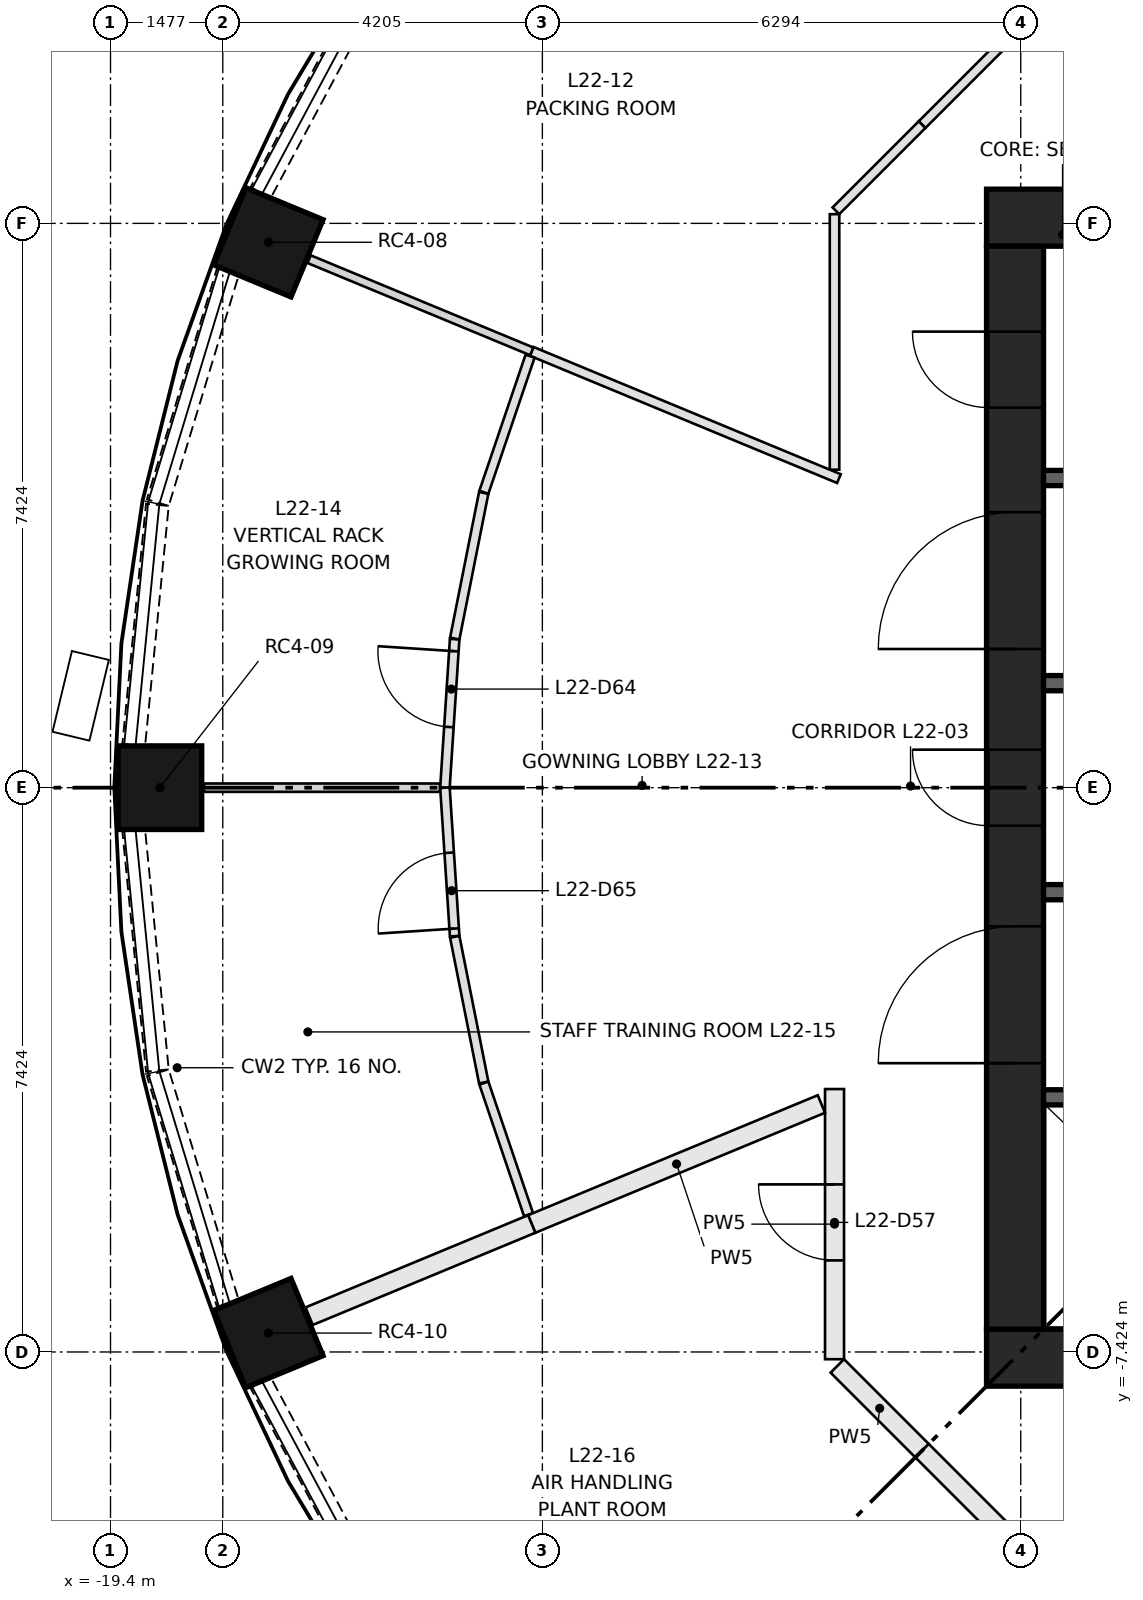
"""IFC4 building model, lengths in metres.
Left out: names, types, materials, properties, quantities, classifications, styles, units other than length and angle.
Written with IfcOpenShell. Run it as: python <this file> out.ifc"""

import sys

from ifc_helpers import new_model, si_unit, direction, frame, frame_2d, origin, origin_2d, place, context, subcontext, project, spatial, rectangle, extrude, element, fill, save


model = new_model("IFC4")
c1 = context("Model", 3, precision=1e-05, world=origin(), true_north=direction((0.0, 1.0)))
c2 = subcontext(c1, "Body", "Model", "MODEL_VIEW")
j1 = project(units=[si_unit("LENGTHUNIT", "METRE"), si_unit("PLANEANGLEUNIT", "RADIAN")], contexts=[c1])
p1 = place(None, origin())
s1 = spatial("IfcSite", under=j1, at=p1, CompositionType="ELEMENT")
p2 = place(p1, origin())
s2 = spatial("IfcBuilding", under=s1, at=p2, CompositionType="ELEMENT")
p3 = place(p2, frame((0.0, 0.0, 87.35)))
s3 = spatial("IfcBuildingStorey", under=s2, at=p3, CompositionType="ELEMENT", Elevation=87.35)
for number, where, z_axis, x_axis in (
    (1, (-17.323, 7.175, 0.0), (0.0, 0.0, 1.0), (-0.924, 0.383, 0.0)),
    (2, (-18.75, 0.0, 0.0), (0.0, 0.0, 1.0), (-1.0, 0.0, 0.0)),
    (3, (-17.323, -7.175, 0.0), (0.0, 0.0, 1.0), (-0.924, -0.383, 0.0)),
):
    element("IfcColumn", number, at=place(p3, frame(where, z_axis=z_axis, x_axis=x_axis)), inside=s3, PredefinedType="COLUMN", context=c2, shape_type="SweptSolid", body=[
        extrude(rectangle(XDim=1.1, YDim=1.1, at=origin_2d()), origin(), (0.0, 0.0, 1.0), 3.65),
    ])
for number, where, z_axis, x_axis in (
    (4, (-7.874, -7.499, 0.0), (0.0, 0.0, 1.0), (1.0, 0.0, 0.0)),
    (5, (-7.874, 7.499, 0.0), (0.0, 0.0, 1.0), (1.0, 0.0, 0.0)),
):
    element("IfcWall", number, at=place(p3, frame(where, z_axis=z_axis, x_axis=x_axis)), inside=s3, PredefinedType="SHEAR", context=c2, shape_type="SweptSolid", body=[
        extrude(rectangle(XDim=15.748, YDim=0.75, at=frame_2d((7.874, 0.0))), origin(), (0.0, 0.0, 1.0), 3.65),
    ])
p4 = place(p3, frame((-7.499, -7.124, 0.0), z_axis=(0.0, 0.0, 1.0), x_axis=(0.0, 1.0, 0.0)))
e6 = element("IfcWall", 6, at=p4, inside=s3, PredefinedType="SHEAR", context=c2, shape_type="SweptSolid", body=[
    extrude(rectangle(XDim=14.248, YDim=0.75, at=frame_2d((7.124, 0.0))), origin(), (0.0, 0.0, 1.0), 3.65),
])
p5 = place(p4, frame((6.624, 0.0, 0.0)))
e7 = element("IfcOpeningElement", 7, at=p5, cuts=e6, PredefinedType="OPENING", context=c2, shape_type="SweptSolid", body=[
    extrude(rectangle(XDim=1.0, YDim=2.1, at=frame_2d((0.5, 1.05))), frame((0.0, 0.385, 0.0), z_axis=(0.0, -1.0, 0.0), x_axis=(1.0, 0.0, 0.0)), (0.0, 0.0, 1.0), 0.77),
])
p6 = place(p4, frame((3.5, 0.0, 0.0)))
e8 = element("IfcOpeningElement", 8, at=p6, cuts=e6, PredefinedType="OPENING", context=c2, shape_type="SweptSolid", body=[
    extrude(rectangle(XDim=1.8, YDim=2.1, at=frame_2d((0.9, 1.05))), frame((0.0, 0.385, 0.0), z_axis=(0.0, -1.0, 0.0), x_axis=(1.0, 0.0, 0.0)), (0.0, 0.0, 1.0), 0.77),
])
p7 = place(p4, frame((8.948, 0.0, 0.0)))
e9 = element("IfcOpeningElement", 9, at=p7, cuts=e6, PredefinedType="OPENING", context=c2, shape_type="SweptSolid", body=[
    extrude(rectangle(XDim=1.8, YDim=2.1, at=frame_2d((0.9, 1.05))), frame((0.0, 0.385, 0.0), z_axis=(0.0, -1.0, 0.0), x_axis=(1.0, 0.0, 0.0)), (0.0, 0.0, 1.0), 0.77),
])
p8 = place(p4, frame((12.124, 0.0, 0.0)))
e10 = element("IfcOpeningElement", 10, at=p8, cuts=e6, PredefinedType="OPENING", context=c2, shape_type="SweptSolid", body=[
    extrude(rectangle(XDim=1.0, YDim=2.1, at=frame_2d((0.5, 1.05))), frame((0.0, 0.385, 0.0), z_axis=(0.0, -1.0, 0.0), x_axis=(1.0, 0.0, 0.0)), (0.0, 0.0, 1.0), 0.77),
])
p9 = place(p3, frame((-7.124, -4.074, 0.0), z_axis=(0.0, 0.0, 1.0), x_axis=(1.0, 0.0, 0.0)))
e11 = element("IfcWall", 11, at=p9, inside=s3, PredefinedType="SHEAR", context=c2, shape_type="SweptSolid", body=[
    extrude(rectangle(XDim=14.248, YDim=0.2, at=frame_2d((7.124, 0.0))), origin(), (0.0, 0.0, 1.0), 3.3),
])
p10 = place(p9, frame((1.069, 0.0, 0.0)))
e12 = element("IfcOpeningElement", 12, at=p10, cuts=e11, PredefinedType="OPENING", context=c2, shape_type="SweptSolid", body=[
    extrude(rectangle(XDim=1.1, YDim=2.1, at=frame_2d((0.55, 1.05))), frame((0.0, 0.11, 0.0), z_axis=(0.0, -1.0, 0.0), x_axis=(1.0, 0.0, 0.0)), (0.0, 0.0, 1.0), 0.22),
])
p11 = place(p9, frame((4.206, 0.0, 0.0)))
e13 = element("IfcOpeningElement", 13, at=p11, cuts=e11, PredefinedType="OPENING", context=c2, shape_type="SweptSolid", body=[
    extrude(rectangle(XDim=1.1, YDim=2.1, at=frame_2d((0.55, 1.05))), frame((0.0, 0.11, 0.0), z_axis=(0.0, -1.0, 0.0), x_axis=(1.0, 0.0, 0.0)), (0.0, 0.0, 1.0), 0.22),
])
p12 = place(p9, frame((6.808, 0.0, 0.0)))
e14 = element("IfcOpeningElement", 14, at=p12, cuts=e11, PredefinedType="OPENING", context=c2, shape_type="SweptSolid", body=[
    extrude(rectangle(XDim=1.0, YDim=2.1, at=frame_2d((0.5, 1.05))), frame((0.0, 0.11, 0.0), z_axis=(0.0, -1.0, 0.0), x_axis=(1.0, 0.0, 0.0)), (0.0, 0.0, 1.0), 0.22),
])
p13 = place(p9, frame((8.777, 0.0, 0.0)))
e15 = element("IfcOpeningElement", 15, at=p13, cuts=e11, PredefinedType="OPENING", context=c2, shape_type="SweptSolid", body=[
    extrude(rectangle(XDim=1.0, YDim=2.1, at=frame_2d((0.5, 1.05))), frame((0.0, 0.11, 0.0), z_axis=(0.0, -1.0, 0.0), x_axis=(1.0, 0.0, 0.0)), (0.0, 0.0, 1.0), 0.22),
])
p14 = place(p9, frame((10.745, 0.0, 0.0)))
e16 = element("IfcOpeningElement", 16, at=p14, cuts=e11, PredefinedType="OPENING", context=c2, shape_type="SweptSolid", body=[
    extrude(rectangle(XDim=1.0, YDim=2.1, at=frame_2d((0.5, 1.05))), frame((0.0, 0.11, 0.0), z_axis=(0.0, -1.0, 0.0), x_axis=(1.0, 0.0, 0.0)), (0.0, 0.0, 1.0), 0.22),
])
p15 = place(p9, frame((12.714, 0.0, 0.0)))
e17 = element("IfcOpeningElement", 17, at=p15, cuts=e11, PredefinedType="OPENING", context=c2, shape_type="SweptSolid", body=[
    extrude(rectangle(XDim=1.0, YDim=2.1, at=frame_2d((0.5, 1.05))), frame((0.0, 0.11, 0.0), z_axis=(0.0, -1.0, 0.0), x_axis=(1.0, 0.0, 0.0)), (0.0, 0.0, 1.0), 0.22),
])
p16 = place(p3, frame((-7.124, 4.074, 0.0), z_axis=(0.0, 0.0, 1.0), x_axis=(1.0, 0.0, 0.0)))
e18 = element("IfcWall", 18, at=p16, inside=s3, PredefinedType="SHEAR", context=c2, shape_type="SweptSolid", body=[
    extrude(rectangle(XDim=7.124, YDim=0.2, at=frame_2d((3.562, 0.0))), origin(), (0.0, 0.0, 1.0), 3.3),
])
for number, where, z_axis, x_axis in (
    (19, (-7.124, -1.375, 0.0), (0.0, 0.0, 1.0), (1.0, 0.0, 0.0)),
    (20, (-7.124, 1.375, 0.0), (0.0, 0.0, 1.0), (1.0, 0.0, 0.0)),
):
    element("IfcWall", number, at=place(p3, frame(where, z_axis=z_axis, x_axis=x_axis)), inside=s3, PredefinedType="SHEAR", context=c2, shape_type="SweptSolid", body=[
        extrude(rectangle(XDim=2.75, YDim=0.2, at=frame_2d((1.375, 0.0))), origin(), (0.0, 0.0, 1.0), 3.3),
    ])
p17 = place(p3, frame((-15.929, 10.626, 0.0), z_axis=(0.0, 0.0, 1.0), x_axis=(-0.471458802606, -0.88188808669, 0.0)))
e21 = element("IfcWall", 21, at=p17, inside=s3, PredefinedType="SOLIDWALL", context=c2, shape_type="SweptSolid", body=[
    extrude(rectangle(XDim=3.172, YDim=0.3, at=frame_2d((1.586, 0.0))), origin(), (0.0, 0.0, 1.0), 0.9),
])
p18 = place(p3, frame((-17.856, 6.787, 0.0), z_axis=(0.0, 0.0, 1.0), x_axis=(-0.290325591482, -0.956927923582, 0.0)))
e22 = element("IfcWall", 22, at=p18, inside=s3, PredefinedType="SOLIDWALL", context=c2, shape_type="SweptSolid", body=[
    extrude(rectangle(XDim=3.173, YDim=0.3, at=frame_2d((1.586, 0.0))), origin(), (0.0, 0.0, 1.0), 0.9),
])
for number, where, z_axis, x_axis in (
    (23, (-18.783, 3.721, 0.0), (0.0, 0.0, 1.0), (-0.098, -0.995, 0.0)),
    (24, (-19.094, -0.564, 0.0), (0.0, 0.0, 1.0), (0.098, -0.995, 0.0)),
):
    element("IfcWall", number, at=place(p3, frame(where, z_axis=z_axis, x_axis=x_axis)), inside=s3, PredefinedType="SOLIDWALL", context=c2, shape_type="SweptSolid", body=[
        extrude(rectangle(XDim=3.173, YDim=0.3, at=frame_2d((1.586, 0.0))), origin(), (0.0, 0.0, 1.0), 0.9),
    ])
p19 = place(p3, frame((-18.778, -3.75, 0.0), z_axis=(0.0, 0.0, 1.0), x_axis=(0.290325591482, -0.956927923582, 0.0)))
e25 = element("IfcWall", 25, at=p19, inside=s3, PredefinedType="SOLIDWALL", context=c2, shape_type="SweptSolid", body=[
    extrude(rectangle(XDim=3.173, YDim=0.3, at=frame_2d((1.586, 0.0))), origin(), (0.0, 0.0, 1.0), 0.9),
])
p20 = place(p3, frame((-17.425, -7.828, 0.0), z_axis=(0.0, 0.0, 1.0), x_axis=(0.471458802606, -0.88188808669, 0.0)))
e26 = element("IfcWall", 26, at=p20, inside=s3, PredefinedType="SOLIDWALL", context=c2, shape_type="SweptSolid", body=[
    extrude(rectangle(XDim=3.172, YDim=0.3, at=frame_2d((1.586, 0.0))), origin(), (0.0, 0.0, 1.0), 0.9),
])
p21 = place(p3, frame((-8.722, 8.722, 0.0), z_axis=(0.0, 0.0, 1.0), x_axis=(0.707030604857, 0.70718294931, 0.0)))
e27 = element("IfcWall", 27, at=p21, inside=s3, PredefinedType="PARTITIONING", context=c2, shape_type="SweptSolid", body=[
    extrude(rectangle(XDim=1.603, YDim=0.125, at=frame_2d((0.801, 0.0))), origin(), (0.0, 0.0, 1.0), 3.3),
])
p22 = place(p3, frame((-9.874, 4.183, 0.0), z_axis=(0.0, 0.0, 1.0), x_axis=(0.0, 1.0, 0.0)))
e28 = element("IfcWall", 28, at=p22, inside=s3, PredefinedType="PARTITIONING", context=c2, shape_type="SweptSolid", body=[
    extrude(rectangle(XDim=3.362, YDim=0.125, at=frame_2d((1.681, 0.0))), origin(), (0.0, 0.0, 1.0), 3.3),
])
p23 = place(p3, frame((-9.856, 7.589, 0.0), z_axis=(0.0, 0.0, 1.0), x_axis=(0.70718294931, 0.707030604857, 0.0)))
e29 = element("IfcWall", 29, at=p23, inside=s3, PredefinedType="PARTITIONING", context=c2, shape_type="SweptSolid", body=[
    extrude(rectangle(XDim=1.603, YDim=0.125, at=frame_2d((0.801, 0.0))), origin(), (0.0, 0.0, 1.0), 3.3),
])
p24 = place(p3, frame((-9.874, -7.519, 0.0), z_axis=(0.0, 0.0, 1.0), x_axis=(0.0, 1.0, 0.0)))
e30 = element("IfcWall", 30, at=p24, inside=s3, PredefinedType="PARTITIONING", context=c2, shape_type="SweptSolid", body=[
    extrude(rectangle(XDim=3.554, YDim=0.25, at=frame_2d((1.777, 0.0))), origin(), (0.0, 0.0, 1.0), 3.3),
])
p25 = place(p24, frame((1.3, 0.0, 0.0)))
e31 = element("IfcOpeningElement", 31, at=p25, cuts=e30, PredefinedType="OPENING", context=c2, shape_type="SweptSolid", body=[
    extrude(rectangle(XDim=1.0, YDim=2.1, at=frame_2d((0.5, 1.05))), frame((0.0, 0.135, 0.0), z_axis=(0.0, -1.0, 0.0), x_axis=(1.0, 0.0, 0.0)), (0.0, 0.0, 1.0), 0.27),
])
for number, where, z_axis, x_axis in (
    (32, (-8.722, -8.722, 0.0), (0.0, 0.0, 1.0), (-0.707, 0.707, 0.0)),
    (33, (-7.608, -9.837, 0.0), (0.0, 0.0, 1.0), (-0.707, 0.707, 0.0)),
):
    element("IfcWall", number, at=place(p3, frame(where, z_axis=z_axis, x_axis=x_axis)), inside=s3, PredefinedType="PARTITIONING", context=c2, shape_type="SweptSolid", body=[
        extrude(rectangle(XDim=1.577, YDim=0.25, at=frame_2d((0.788, 0.0))), origin(), (0.0, 0.0, 1.0), 3.3),
    ])
p26 = place(p3, frame((-9.816, 4.066, 0.0), z_axis=(0.0, 0.0, 1.0), x_axis=(-0.923865829688, 0.382716512232, 0.0)))
e34 = element("IfcWall", 34, at=p26, inside=s3, PredefinedType="PARTITIONING", context=c2, shape_type="SweptSolid", body=[
    extrude(rectangle(XDim=4.375, YDim=0.125, at=frame_2d((2.188, 0.0))), origin(), (0.0, 0.0, 1.0), 3.3),
])
p27 = place(p3, frame((-13.858, 5.74, 0.0), z_axis=(0.0, 0.0, 1.0), x_axis=(-0.923876970079, 0.382689618566, 0.0)))
e35 = element("IfcWall", 35, at=p27, inside=s3, PredefinedType="PARTITIONING", context=c2, shape_type="SweptSolid", body=[
    extrude(rectangle(XDim=3.17, YDim=0.11, at=frame_2d((1.585, 0.0))), origin(), (0.0, 0.0, 1.0), 3.3),
])
p28 = place(p3, frame((-15.0, 0.0, 0.0), z_axis=(0.0, 0.0, 1.0), x_axis=(0.065335548621, 0.997863350407, 0.0)))
e36 = element("IfcWall", 36, at=p28, inside=s3, PredefinedType="PARTITIONING", context=c2, shape_type="SweptSolid", body=[
    extrude(rectangle(XDim=1.958, YDim=0.125, at=frame_2d((0.979, 0.0))), origin(), (0.0, 0.0, 1.0), 3.3),
])
p29 = place(p28, frame((0.8, 0.0, 0.0)))
e37 = element("IfcOpeningElement", 37, at=p29, cuts=e36, PredefinedType="OPENING", context=c2, shape_type="SweptSolid", body=[
    extrude(rectangle(XDim=1.0, YDim=2.1, at=frame_2d((0.5, 1.05))), frame((0.0, 0.073, 0.0), z_axis=(0.0, -1.0, 0.0), x_axis=(1.0, 0.0, 0.0)), (0.0, 0.0, 1.0), 0.145),
])
p30 = place(p3, frame((-14.871, 1.962, 0.0), z_axis=(0.0, 0.0, 1.0), x_axis=(0.195034785279, 0.980796325713, 0.0)))
e38 = element("IfcWall", 38, at=p30, inside=s3, PredefinedType="PARTITIONING", context=c2, shape_type="SweptSolid", body=[
    extrude(rectangle(XDim=1.954, YDim=0.125, at=frame_2d((0.977, 0.0))), origin(), (0.0, 0.0, 1.0), 3.3),
])
p31 = place(p3, frame((-14.488, 3.886, 0.0), z_axis=(0.0, 0.0, 1.0), x_axis=(0.321451389675, 0.946926081633, 0.0)))
e39 = element("IfcWall", 39, at=p31, inside=s3, PredefinedType="PARTITIONING", context=c2, shape_type="SweptSolid", body=[
    extrude(rectangle(XDim=1.891, YDim=0.125, at=frame_2d((0.946, 0.0))), origin(), (0.0, 0.0, 1.0), 3.3),
])
p32 = place(p3, frame((-14.872, -1.954, 0.0), z_axis=(0.0, 0.0, 1.0), x_axis=(-0.065335548621, 0.997863350407, 0.0)))
e40 = element("IfcWall", 40, at=p32, inside=s3, PredefinedType="PARTITIONING", context=c2, shape_type="SweptSolid", body=[
    extrude(rectangle(XDim=1.958, YDim=0.125, at=frame_2d((0.979, 0.0))), origin(), (0.0, 0.0, 1.0), 3.3),
])
p33 = place(p32, frame((0.1, 0.0, 0.0)))
e41 = element("IfcOpeningElement", 41, at=p33, cuts=e40, PredefinedType="OPENING", context=c2, shape_type="SweptSolid", body=[
    extrude(rectangle(XDim=1.0, YDim=2.1, at=frame_2d((0.5, 1.05))), frame((0.0, 0.073, 0.0), z_axis=(0.0, -1.0, 0.0), x_axis=(1.0, 0.0, 0.0)), (0.0, 0.0, 1.0), 0.145),
])
p34 = place(p3, frame((-14.49, -3.878, 0.0), z_axis=(0.0, 0.0, 1.0), x_axis=(-0.195034785279, 0.980796325713, 0.0)))
e42 = element("IfcWall", 42, at=p34, inside=s3, PredefinedType="PARTITIONING", context=c2, shape_type="SweptSolid", body=[
    extrude(rectangle(XDim=1.954, YDim=0.125, at=frame_2d((0.977, 0.0))), origin(), (0.0, 0.0, 1.0), 3.3),
])
p35 = place(p3, frame((-13.9, -5.618, 0.0), z_axis=(0.0, 0.0, 1.0), x_axis=(-0.321390424162, 0.946946775303, 0.0)))
e43 = element("IfcWall", 43, at=p35, inside=s3, PredefinedType="PARTITIONING", context=c2, shape_type="SweptSolid", body=[
    extrude(rectangle(XDim=1.828, YDim=0.125, at=frame_2d((0.914, 0.0))), origin(), (0.0, 0.0, 1.0), 3.3),
])
p36 = place(p3, frame((-10.047, -4.162, 0.0), z_axis=(0.0, 0.0, 1.0), x_axis=(-0.92388555685, -0.382668888001, 0.0)))
e44 = element("IfcWall", 44, at=p36, inside=s3, PredefinedType="PARTITIONING", context=c2, shape_type="SweptSolid", body=[
    extrude(rectangle(XDim=4.125, YDim=0.25, at=frame_2d((2.062, 0.0))), origin(), (0.0, 0.0, 1.0), 3.3),
])
p37 = place(p3, frame((-15.066, 0.0, 0.0), z_axis=(0.0, 0.0, 1.0), x_axis=(-1.0, 0.0, 0.0)))
e45 = element("IfcWall", 45, at=p37, inside=s3, PredefinedType="PARTITIONING", context=c2, shape_type="SweptSolid", body=[
    extrude(rectangle(XDim=3.104, YDim=0.11, at=frame_2d((1.552, 0.0))), origin(), (0.0, 0.0, 1.0), 3.3),
])
p38 = place(p3, frame((-13.858, -5.74, 0.0), z_axis=(0.0, 0.0, 1.0), x_axis=(-0.923876970079, -0.382689618566, 0.0)))
e46 = element("IfcWall", 46, at=p38, inside=s3, PredefinedType="PARTITIONING", context=c2, shape_type="SweptSolid", body=[
    extrude(rectangle(XDim=3.17, YDim=0.25, at=frame_2d((1.585, 0.0))), origin(), (0.0, 0.0, 1.0), 3.3),
])
p39 = place(p5, origin())
e47 = element("IfcDoor", 47, at=p39, inside=s3, OperationType="SINGLE_SWING_RIGHT", PredefinedType="DOOR", context=c2, shape_type="SweptSolid", body=[
    extrude(rectangle(XDim=1.0, YDim=2.1, at=frame_2d((0.5, 1.05))), frame((0.0, 0.375, 0.0), z_axis=(0.0, -1.0, 0.0), x_axis=(1.0, 0.0, 0.0)), (0.0, 0.0, 1.0), 0.05),
])
fill(e7, e47)
p40 = place(p6, origin())
e48 = element("IfcDoor", 48, at=p40, inside=s3, OperationType="DOUBLE_DOOR_SINGLE_SWING", PredefinedType="DOOR", context=c2, shape_type="SweptSolid", body=[
    extrude(rectangle(XDim=1.8, YDim=2.1, at=frame_2d((0.9, 1.05))), frame((0.0, 0.025, 0.0), z_axis=(0.0, -1.0, 0.0), x_axis=(1.0, 0.0, 0.0)), (0.0, 0.0, 1.0), 0.05),
])
fill(e8, e48)
p41 = place(p7, origin())
e49 = element("IfcDoor", 49, at=p41, inside=s3, OperationType="DOUBLE_DOOR_SINGLE_SWING", PredefinedType="DOOR", context=c2, shape_type="SweptSolid", body=[
    extrude(rectangle(XDim=1.8, YDim=2.1, at=frame_2d((0.9, 1.05))), frame((0.0, 0.025, 0.0), z_axis=(0.0, -1.0, 0.0), x_axis=(1.0, 0.0, 0.0)), (0.0, 0.0, 1.0), 0.05),
])
fill(e9, e49)
p42 = place(p8, origin())
e50 = element("IfcDoor", 50, at=p42, inside=s3, OperationType="SINGLE_SWING_RIGHT", PredefinedType="DOOR", context=c2, shape_type="SweptSolid", body=[
    extrude(rectangle(XDim=1.0, YDim=2.1, at=frame_2d((0.5, 1.05))), frame((0.0, 0.375, 0.0), z_axis=(0.0, -1.0, 0.0), x_axis=(1.0, 0.0, 0.0)), (0.0, 0.0, 1.0), 0.05),
])
fill(e10, e50)
p43 = place(p25, origin())
e51 = element("IfcDoor", 51, at=p43, inside=s3, OperationType="SINGLE_SWING_RIGHT", PredefinedType="DOOR", context=c2, shape_type="SweptSolid", body=[
    extrude(rectangle(XDim=1.0, YDim=2.1, at=frame_2d((0.5, 1.05))), frame((0.0, 0.025, 0.0), z_axis=(0.0, -1.0, 0.0), x_axis=(1.0, 0.0, 0.0)), (0.0, 0.0, 1.0), 0.05),
])
fill(e31, e51)
p44 = place(p29, origin())
e52 = element("IfcDoor", 52, at=p44, inside=s3, OperationType="SINGLE_SWING_RIGHT", PredefinedType="DOOR", context=c2, shape_type="SweptSolid", body=[
    extrude(rectangle(XDim=1.0, YDim=2.1, at=frame_2d((0.5, 1.05))), frame((0.0, 0.025, 0.0), z_axis=(0.0, -1.0, 0.0), x_axis=(1.0, 0.0, 0.0)), (0.0, 0.0, 1.0), 0.05),
])
fill(e37, e52)
p45 = place(p33, origin())
e53 = element("IfcDoor", 53, at=p45, inside=s3, OperationType="SINGLE_SWING_LEFT", PredefinedType="DOOR", context=c2, shape_type="SweptSolid", body=[
    extrude(rectangle(XDim=1.0, YDim=2.1, at=frame_2d((0.5, 1.05))), frame((0.0, 0.025, 0.0), z_axis=(0.0, -1.0, 0.0), x_axis=(1.0, 0.0, 0.0)), (0.0, 0.0, 1.0), 0.05),
])
fill(e41, e53)
save(model, sys.argv[1])
